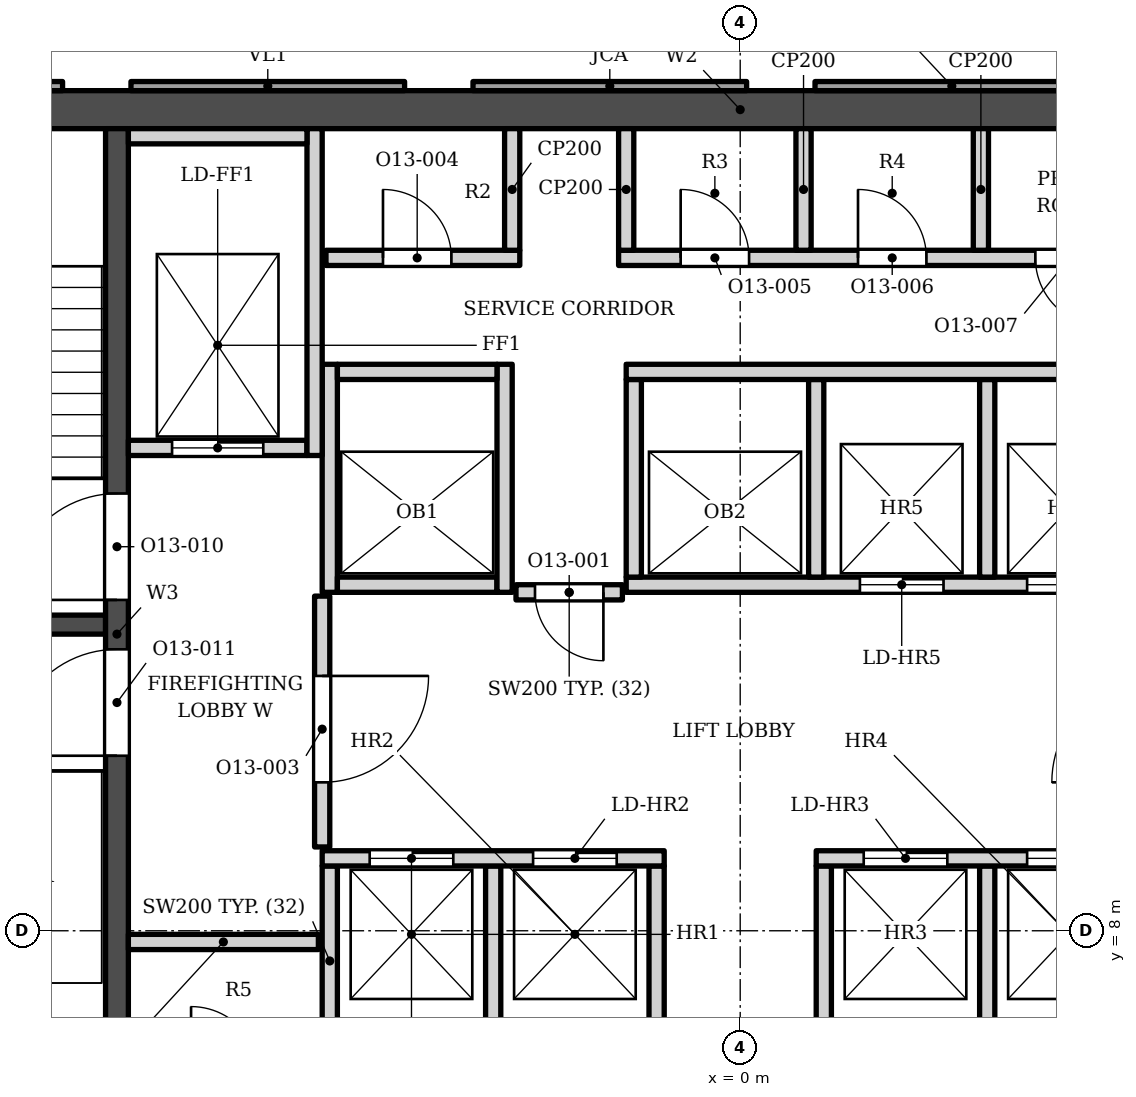
"""IFC4 building model, lengths in metres.
Left out: names, types, materials, properties, quantities, classifications, styles, units other than length and angle.
Written with IfcOpenShell. Run it as: python <this file> out.ifc"""

import sys

from ifc_helpers import new_model, si_unit, direction, frame, frame_2d, origin, place, context, subcontext, project, spatial, polyline, rectangle, outline, extrude, element, fill, save


model = new_model("IFC4")
c1 = context("Model", 3, precision=1e-05, world=origin(), true_north=direction((0.0, 1.0)))
c2 = subcontext(c1, "Body", "Model", "MODEL_VIEW")
j1 = project(units=[si_unit("LENGTHUNIT", "METRE"), si_unit("PLANEANGLEUNIT", "RADIAN")], contexts=[c1])
p1 = place(None, origin())
s1 = spatial("IfcSite", under=j1, at=p1, CompositionType="ELEMENT")
p2 = place(p1, origin())
s2 = spatial("IfcBuilding", under=s1, at=p2, CompositionType="ELEMENT")
p3 = place(p2, frame((0.0, 0.0, 287.2)))
s3 = spatial("IfcBuildingStorey", under=s2, at=p3, CompositionType="ELEMENT", Elevation=287.2)
p4 = place(p3, frame((-12.1, 18.802, 0.0), z_axis=(0.0, 0.0, 1.0), x_axis=(1.0, 0.0, 0.0)))
e1 = element("IfcWall", 1, at=p4, inside=s3, PredefinedType="SHEAR", context=c2, shape_type="SweptSolid", body=[
    extrude(rectangle(XDim=24.2, YDim=0.5, at=frame_2d((12.1, 0.0))), origin(), (0.0, 0.0, 1.0), 3.9),
])
p5 = place(p3, frame((-8.2, 5.253, 0.0), z_axis=(0.0, 0.0, 1.0), x_axis=(0.0, 1.0, 0.0)))
e2 = element("IfcWall", 2, at=p5, inside=s3, PredefinedType="SHEAR", context=c2, shape_type="SweptSolid", body=[
    extrude(rectangle(XDim=13.3, YDim=0.3, at=frame_2d((6.65, 0.0))), origin(), (0.0, 0.0, 1.0), 3.9),
])
p6 = place(p5, frame((7.1, 0.0, 0.0)))
e3 = element("IfcOpeningElement", 3, at=p6, cuts=e2, PredefinedType="OPENING", context=c2, shape_type="SweptSolid", body=[
    extrude(rectangle(XDim=1.4, YDim=2.1, at=frame_2d((0.7, 1.05))), frame((0.0, 0.16, 0.0), z_axis=(0.0, -1.0, 0.0), x_axis=(1.0, 0.0, 0.0)), (0.0, 0.0, 1.0), 0.32),
])
p7 = place(p5, frame((5.05, 0.0, 0.0)))
e4 = element("IfcOpeningElement", 4, at=p7, cuts=e2, PredefinedType="OPENING", context=c2, shape_type="SweptSolid", body=[
    extrude(rectangle(XDim=1.4, YDim=2.1, at=frame_2d((0.7, 1.05))), frame((0.0, 0.16, 0.0), z_axis=(0.0, -1.0, 0.0), x_axis=(1.0, 0.0, 0.0)), (0.0, 0.0, 1.0), 0.32),
])
p8 = place(p3, frame((-12.1, 12.028, 0.0), z_axis=(0.0, 0.0, 1.0), x_axis=(1.0, 0.0, 0.0)))
e5 = element("IfcWall", 5, at=p8, inside=s3, PredefinedType="SHEAR", context=c2, shape_type="SweptSolid", body=[
    extrude(rectangle(XDim=3.75, YDim=0.25, at=frame_2d((1.875, 0.0))), origin(), (0.0, 0.0, 1.0), 3.9),
])
p9 = place(p3, origin())
e6 = element("IfcWall", 6, at=p9, inside=s3, PredefinedType="ELEMENTEDWALL", context=c2, shape_type="SweptSolid", body=[
    extrude(outline(polyline([(0.984, 19.173), (0.984, 19.052), (4.584, 19.052), (4.584, 19.173), (0.984, 19.173)])), origin(), (0.0, 0.0, 1.0), 3.0),
])
p10 = place(p3, origin())
e7 = element("IfcWall", 7, at=p10, inside=s3, PredefinedType="SOLIDWALL", context=c2, shape_type="SweptSolid", body=[
    extrude(outline(polyline([(-3.516, 19.173), (-3.516, 19.052), (0.084, 19.052), (0.084, 19.173), (-3.516, 19.173)])), origin(), (0.0, 0.0, 1.0), 3.0),
])
p11 = place(p3, origin())
e8 = element("IfcWall", 8, at=p11, inside=s3, PredefinedType="ELEMENTEDWALL", context=c2, shape_type="SweptSolid", body=[
    extrude(outline(polyline([(-8.016, 19.173), (-8.016, 19.052), (-4.416, 19.052), (-4.416, 19.173), (-8.016, 19.173)])), origin(), (0.0, 0.0, 1.0), 3.0),
])
p12 = place(p3, origin())
e9 = element("IfcWall", 9, at=p12, inside=s3, PredefinedType="SOLIDWALL", context=c2, shape_type="SweptSolid", body=[
    extrude(outline(polyline([(-12.515, 19.173), (-12.515, 19.052), (-8.916, 19.052), (-8.916, 19.173), (-12.515, 19.173)])), origin(), (0.0, 0.0, 1.0), 3.0),
])
for number, where, z_axis, x_axis in (
    (10, (-5.4, 6.353, 0.0), (0.0, 0.0, 1.0), (0.0, 1.0, 0.0)),
    (11, (-3.25, 6.353, 0.0), (0.0, 0.0, 1.0), (0.0, 1.0, 0.0)),
    (12, (-1.1, 6.353, 0.0), (0.0, 0.0, 1.0), (0.0, 1.0, 0.0)),
    (13, (1.1, 6.353, 0.0), (0.0, 0.0, 1.0), (0.0, 1.0, 0.0)),
    (14, (3.25, 6.353, 0.0), (0.0, 0.0, 1.0), (0.0, 1.0, 0.0)),
    (15, (-8.05, 7.853, 0.0), (0.0, 0.0, 1.0), (1.0, 0.0, 0.0)),
):
    element("IfcWall", number, at=place(p3, frame(where, z_axis=z_axis, x_axis=x_axis)), inside=s3, PredefinedType="SOLIDWALL", context=c2, shape_type="SweptSolid", body=[
        extrude(rectangle(XDim=2.5, YDim=0.2, at=frame_2d((1.25, 0.0))), origin(), (0.0, 0.0, 1.0), 3.73),
    ])
p13 = place(p3, frame((-5.5, 8.953, 0.0), z_axis=(0.0, 0.0, 1.0), x_axis=(1.0, 0.0, 0.0)))
e16 = element("IfcWall", 16, at=p13, inside=s3, PredefinedType="SOLIDWALL", context=c2, shape_type="SweptSolid", body=[
    extrude(rectangle(XDim=4.5, YDim=0.2, at=frame_2d((2.25, 0.0))), origin(), (0.0, 0.0, 1.0), 3.73),
])
p14 = place(p13, frame((0.625, 0.0, 0.0)))
e17 = element("IfcOpeningElement", 17, at=p14, cuts=e16, PredefinedType="OPENING", context=c2, shape_type="SweptSolid", body=[
    extrude(rectangle(XDim=1.1, YDim=2.1, at=frame_2d((0.55, 1.05))), frame((0.0, 0.11, 0.0), z_axis=(0.0, -1.0, 0.0), x_axis=(1.0, 0.0, 0.0)), (0.0, 0.0, 1.0), 0.22),
])
p15 = place(p13, frame((2.775, 0.0, 0.0)))
e18 = element("IfcOpeningElement", 18, at=p15, cuts=e16, PredefinedType="OPENING", context=c2, shape_type="SweptSolid", body=[
    extrude(rectangle(XDim=1.1, YDim=2.1, at=frame_2d((0.55, 1.05))), frame((0.0, 0.11, 0.0), z_axis=(0.0, -1.0, 0.0), x_axis=(1.0, 0.0, 0.0)), (0.0, 0.0, 1.0), 0.22),
])
p16 = place(p3, frame((1.0, 8.953, 0.0), z_axis=(0.0, 0.0, 1.0), x_axis=(1.0, 0.0, 0.0)))
e19 = element("IfcWall", 19, at=p16, inside=s3, PredefinedType="SOLIDWALL", context=c2, shape_type="SweptSolid", body=[
    extrude(rectangle(XDim=4.5, YDim=0.2, at=frame_2d((2.25, 0.0))), origin(), (0.0, 0.0, 1.0), 3.73),
])
p17 = place(p16, frame((0.625, 0.0, 0.0)))
e20 = element("IfcOpeningElement", 20, at=p17, cuts=e19, PredefinedType="OPENING", context=c2, shape_type="SweptSolid", body=[
    extrude(rectangle(XDim=1.1, YDim=2.1, at=frame_2d((0.55, 1.05))), frame((0.0, 0.11, 0.0), z_axis=(0.0, -1.0, 0.0), x_axis=(1.0, 0.0, 0.0)), (0.0, 0.0, 1.0), 0.22),
])
p18 = place(p16, frame((2.775, 0.0, 0.0)))
e21 = element("IfcOpeningElement", 21, at=p18, cuts=e19, PredefinedType="OPENING", context=c2, shape_type="SweptSolid", body=[
    extrude(rectangle(XDim=1.1, YDim=2.1, at=frame_2d((0.55, 1.05))), frame((0.0, 0.11, 0.0), z_axis=(0.0, -1.0, 0.0), x_axis=(1.0, 0.0, 0.0)), (0.0, 0.0, 1.0), 0.22),
])
p19 = place(p3, frame((-5.5, 9.103, 0.0), z_axis=(0.0, 0.0, 1.0), x_axis=(0.0, 1.0, 0.0)))
e22 = element("IfcWall", 22, at=p19, inside=s3, PredefinedType="SOLIDWALL", context=c2, shape_type="SweptSolid", body=[
    extrude(rectangle(XDim=3.3, YDim=0.2, at=frame_2d((1.65, 0.0))), origin(), (0.0, 0.0, 1.0), 3.73),
])
p20 = place(p19, frame((0.85, 0.0, 0.0)))
e23 = element("IfcOpeningElement", 23, at=p20, cuts=e22, PredefinedType="OPENING", context=c2, shape_type="SweptSolid", body=[
    extrude(rectangle(XDim=1.4, YDim=2.1, at=frame_2d((0.7, 1.05))), frame((0.0, 0.11, 0.0), z_axis=(0.0, -1.0, 0.0), x_axis=(1.0, 0.0, 0.0)), (0.0, 0.0, 1.0), 0.22),
])
p21 = place(p3, frame((-2.95, 12.453, 0.0), z_axis=(0.0, 0.0, 1.0), x_axis=(1.0, 0.0, 0.0)))
e24 = element("IfcWall", 24, at=p21, inside=s3, PredefinedType="SOLIDWALL", context=c2, shape_type="SweptSolid", body=[
    extrude(rectangle(XDim=1.4, YDim=0.2, at=frame_2d((0.7, 0.0))), origin(), (0.0, 0.0, 1.0), 3.73),
])
p22 = place(p21, frame((0.25, 0.0, 0.0)))
e25 = element("IfcOpeningElement", 25, at=p22, cuts=e24, PredefinedType="OPENING", context=c2, shape_type="SweptSolid", body=[
    extrude(rectangle(XDim=0.9, YDim=2.1, at=frame_2d((0.45, 1.05))), frame((0.0, 0.11, 0.0), z_axis=(0.0, -1.0, 0.0), x_axis=(1.0, 0.0, 0.0)), (0.0, 0.0, 1.0), 0.22),
])
p23 = place(p3, frame((-5.4, 12.453, 0.0), z_axis=(0.0, 0.0, 1.0), x_axis=(0.0, 1.0, 0.0)))
e26 = element("IfcWall", 26, at=p23, inside=s3, PredefinedType="SOLIDWALL", context=c2, shape_type="SweptSolid", body=[
    extrude(rectangle(XDim=3.0, YDim=0.2, at=frame_2d((1.5, 0.0))), origin(), (0.0, 0.0, 1.0), 3.73),
])
p24 = place(p3, frame((-5.3, 12.552, 0.0), z_axis=(0.0, 0.0, 1.0), x_axis=(1.0, 0.0, 0.0)))
e27 = element("IfcWall", 27, at=p24, inside=s3, PredefinedType="SOLIDWALL", context=c2, shape_type="SweptSolid", body=[
    extrude(rectangle(XDim=2.1, YDim=0.2, at=frame_2d((1.05, 0.0))), origin(), (0.0, 0.0, 1.0), 3.73),
])
p25 = place(p3, frame((-3.1, 12.453, 0.0), z_axis=(0.0, 0.0, 1.0), x_axis=(0.0, 1.0, 0.0)))
e28 = element("IfcWall", 28, at=p25, inside=s3, PredefinedType="SOLIDWALL", context=c2, shape_type="SweptSolid", body=[
    extrude(rectangle(XDim=3.0, YDim=0.2, at=frame_2d((1.5, 0.0))), origin(), (0.0, 0.0, 1.0), 3.73),
])
p26 = place(p3, frame((-1.5, 12.552, 0.0), z_axis=(0.0, 0.0, 1.0), x_axis=(1.0, 0.0, 0.0)))
e29 = element("IfcWall", 29, at=p26, inside=s3, PredefinedType="SOLIDWALL", context=c2, shape_type="SweptSolid", body=[
    extrude(rectangle(XDim=7.0, YDim=0.2, at=frame_2d((3.5, 0.0))), origin(), (0.0, 0.0, 1.0), 3.73),
])
p27 = place(p26, frame((3.075, 0.0, 0.0)))
e30 = element("IfcOpeningElement", 30, at=p27, cuts=e29, PredefinedType="OPENING", context=c2, shape_type="SweptSolid", body=[
    extrude(rectangle(XDim=1.1, YDim=2.1, at=frame_2d((0.55, 1.05))), frame((0.0, 0.11, 0.0), z_axis=(0.0, -1.0, 0.0), x_axis=(1.0, 0.0, 0.0)), (0.0, 0.0, 1.0), 0.22),
])
p28 = place(p26, frame((5.275, 0.0, 0.0)))
e31 = element("IfcOpeningElement", 31, at=p28, cuts=e29, PredefinedType="OPENING", context=c2, shape_type="SweptSolid", body=[
    extrude(rectangle(XDim=1.1, YDim=2.1, at=frame_2d((0.55, 1.05))), frame((0.0, 0.11, 0.0), z_axis=(0.0, -1.0, 0.0), x_axis=(1.0, 0.0, 0.0)), (0.0, 0.0, 1.0), 0.22),
])
for number, where, z_axis, x_axis in (
    (32, (-1.4, 12.653, 0.0), (0.0, 0.0, 1.0), (0.0, 1.0, 0.0)),
    (33, (1.0, 12.653, 0.0), (0.0, 0.0, 1.0), (0.0, 1.0, 0.0)),
    (34, (3.25, 12.653, 0.0), (0.0, 0.0, 1.0), (0.0, 1.0, 0.0)),
):
    element("IfcWall", number, at=place(p3, frame(where, z_axis=z_axis, x_axis=x_axis)), inside=s3, PredefinedType="SOLIDWALL", context=c2, shape_type="SweptSolid", body=[
        extrude(rectangle(XDim=2.6, YDim=0.2, at=frame_2d((1.3, 0.0))), origin(), (0.0, 0.0, 1.0), 3.73),
    ])
p29 = place(p3, frame((-8.05, 14.353, 0.0), z_axis=(0.0, 0.0, 1.0), x_axis=(1.0, 0.0, 0.0)))
e35 = element("IfcWall", 35, at=p29, inside=s3, PredefinedType="SOLIDWALL", context=c2, shape_type="SweptSolid", body=[
    extrude(rectangle(XDim=2.35, YDim=0.2, at=frame_2d((1.175, 0.0))), origin(), (0.0, 0.0, 1.0), 3.73),
])
p30 = place(p29, frame((0.575, 0.0, 0.0)))
e36 = element("IfcOpeningElement", 36, at=p30, cuts=e35, PredefinedType="OPENING", context=c2, shape_type="SweptSolid", body=[
    extrude(rectangle(XDim=1.2, YDim=2.1, at=frame_2d((0.6, 1.05))), frame((0.0, 0.11, 0.0), z_axis=(0.0, -1.0, 0.0), x_axis=(1.0, 0.0, 0.0)), (0.0, 0.0, 1.0), 0.22),
])
p31 = place(p3, frame((-5.6, 14.253, 0.0), z_axis=(0.0, 0.0, 1.0), x_axis=(0.0, 1.0, 0.0)))
e37 = element("IfcWall", 37, at=p31, inside=s3, PredefinedType="SOLIDWALL", context=c2, shape_type="SweptSolid", body=[
    extrude(rectangle(XDim=4.3, YDim=0.2, at=frame_2d((2.15, 0.0))), origin(), (0.0, 0.0, 1.0), 3.73),
])
p32 = place(p3, frame((-5.3, 15.353, 0.0), z_axis=(0.0, 0.0, 1.0), x_axis=(1.0, 0.0, 0.0)))
e38 = element("IfcWall", 38, at=p32, inside=s3, PredefinedType="SOLIDWALL", context=c2, shape_type="SweptSolid", body=[
    extrude(rectangle(XDim=2.1, YDim=0.2, at=frame_2d((1.05, 0.0))), origin(), (0.0, 0.0, 1.0), 3.73),
])
p33 = place(p3, frame((-1.5, 15.353, 0.0), z_axis=(0.0, 0.0, 1.0), x_axis=(1.0, 0.0, 0.0)))
e39 = element("IfcWall", 39, at=p33, inside=s3, PredefinedType="SOLIDWALL", context=c2, shape_type="SweptSolid", body=[
    extrude(rectangle(XDim=7.2, YDim=0.2, at=frame_2d((3.6, 0.0))), origin(), (0.0, 0.0, 1.0), 3.73),
])
p34 = place(p3, frame((-5.45, 16.853, 0.0), z_axis=(0.0, 0.0, 1.0), x_axis=(1.0, 0.0, 0.0)))
e40 = element("IfcWall", 40, at=p34, inside=s3, PredefinedType="SOLIDWALL", context=c2, shape_type="SweptSolid", body=[
    extrude(rectangle(XDim=2.55, YDim=0.2, at=frame_2d((1.275, 0.0))), origin(), (0.0, 0.0, 1.0), 3.73),
])
p35 = place(p34, frame((0.75, 0.0, 0.0)))
e41 = element("IfcOpeningElement", 41, at=p35, cuts=e40, PredefinedType="OPENING", context=c2, shape_type="SweptSolid", body=[
    extrude(rectangle(XDim=0.9, YDim=2.1, at=frame_2d((0.45, 1.05))), frame((0.0, 0.11, 0.0), z_axis=(0.0, -1.0, 0.0), x_axis=(1.0, 0.0, 0.0)), (0.0, 0.0, 1.0), 0.22),
])
p36 = place(p3, frame((-1.6, 16.853, 0.0), z_axis=(0.0, 0.0, 1.0), x_axis=(1.0, 0.0, 0.0)))
e42 = element("IfcWall", 42, at=p36, inside=s3, PredefinedType="SOLIDWALL", context=c2, shape_type="SweptSolid", body=[
    extrude(rectangle(XDim=7.05, YDim=0.2, at=frame_2d((3.525, 0.0))), origin(), (0.0, 0.0, 1.0), 3.73),
])
p37 = place(p36, frame((0.817, 0.0, 0.0)))
e43 = element("IfcOpeningElement", 43, at=p37, cuts=e42, PredefinedType="OPENING", context=c2, shape_type="SweptSolid", body=[
    extrude(rectangle(XDim=0.9, YDim=2.1, at=frame_2d((0.45, 1.05))), frame((0.0, 0.11, 0.0), z_axis=(0.0, -1.0, 0.0), x_axis=(1.0, 0.0, 0.0)), (0.0, 0.0, 1.0), 0.22),
])
p38 = place(p36, frame((3.15, 0.0, 0.0)))
e44 = element("IfcOpeningElement", 44, at=p38, cuts=e42, PredefinedType="OPENING", context=c2, shape_type="SweptSolid", body=[
    extrude(rectangle(XDim=0.9, YDim=2.1, at=frame_2d((0.45, 1.05))), frame((0.0, 0.11, 0.0), z_axis=(0.0, -1.0, 0.0), x_axis=(1.0, 0.0, 0.0)), (0.0, 0.0, 1.0), 0.22),
])
p39 = place(p36, frame((5.483, 0.0, 0.0)))
e45 = element("IfcOpeningElement", 45, at=p39, cuts=e42, PredefinedType="OPENING", context=c2, shape_type="SweptSolid", body=[
    extrude(rectangle(XDim=0.9, YDim=2.1, at=frame_2d((0.45, 1.05))), frame((0.0, 0.11, 0.0), z_axis=(0.0, -1.0, 0.0), x_axis=(1.0, 0.0, 0.0)), (0.0, 0.0, 1.0), 0.22),
])
for number, where, z_axis, x_axis in (
    (46, (-3.0, 16.953, 0.0), (0.0, 0.0, 1.0), (0.0, 1.0, 0.0)),
    (47, (-1.5, 16.953, 0.0), (0.0, 0.0, 1.0), (0.0, 1.0, 0.0)),
    (48, (0.833, 16.953, 0.0), (0.0, 0.0, 1.0), (0.0, 1.0, 0.0)),
    (49, (3.167, 16.953, 0.0), (0.0, 0.0, 1.0), (0.0, 1.0, 0.0)),
):
    element("IfcWall", number, at=place(p3, frame(where, z_axis=z_axis, x_axis=x_axis)), inside=s3, PredefinedType="PARTITIONING", context=c2, shape_type="SweptSolid", body=[
        extrude(rectangle(XDim=1.6, YDim=0.2, at=frame_2d((0.8, 0.0))), origin(), (0.0, 0.0, 1.0), 3.73),
    ])
p40 = place(p3, frame((-8.05, 18.453, 0.0), z_axis=(0.0, 0.0, 1.0), x_axis=(1.0, 0.0, 0.0)))
e50 = element("IfcWall", 50, at=p40, inside=s3, PredefinedType="SOLIDWALL", context=c2, shape_type="SweptSolid", body=[
    extrude(rectangle(XDim=2.35, YDim=0.2, at=frame_2d((1.175, 0.0))), origin(), (0.0, 0.0, 1.0), 3.73),
])
p41 = place(p14, origin())
e51 = element("IfcDoor", 51, at=p41, inside=s3, OperationType="DOUBLE_DOOR_SLIDING", PredefinedType="DOOR", context=c2, shape_type="SweptSolid", body=[
    extrude(rectangle(XDim=1.1, YDim=2.1, at=frame_2d((0.55, 1.05))), frame((0.0, 0.025, 0.0), z_axis=(0.0, -1.0, 0.0), x_axis=(1.0, 0.0, 0.0)), (0.0, 0.0, 1.0), 0.05),
])
fill(e17, e51)
p42 = place(p15, origin())
e52 = element("IfcDoor", 52, at=p42, inside=s3, OperationType="DOUBLE_DOOR_SLIDING", PredefinedType="DOOR", context=c2, shape_type="SweptSolid", body=[
    extrude(rectangle(XDim=1.1, YDim=2.1, at=frame_2d((0.55, 1.05))), frame((0.0, 0.025, 0.0), z_axis=(0.0, -1.0, 0.0), x_axis=(1.0, 0.0, 0.0)), (0.0, 0.0, 1.0), 0.05),
])
fill(e18, e52)
p43 = place(p17, origin())
e53 = element("IfcDoor", 53, at=p43, inside=s3, OperationType="DOUBLE_DOOR_SLIDING", PredefinedType="DOOR", context=c2, shape_type="SweptSolid", body=[
    extrude(rectangle(XDim=1.1, YDim=2.1, at=frame_2d((0.55, 1.05))), frame((0.0, 0.025, 0.0), z_axis=(0.0, -1.0, 0.0), x_axis=(1.0, 0.0, 0.0)), (0.0, 0.0, 1.0), 0.05),
])
fill(e20, e53)
p44 = place(p18, origin())
e54 = element("IfcDoor", 54, at=p44, inside=s3, OperationType="DOUBLE_DOOR_SLIDING", PredefinedType="DOOR", context=c2, shape_type="SweptSolid", body=[
    extrude(rectangle(XDim=1.1, YDim=2.1, at=frame_2d((0.55, 1.05))), frame((0.0, 0.025, 0.0), z_axis=(0.0, -1.0, 0.0), x_axis=(1.0, 0.0, 0.0)), (0.0, 0.0, 1.0), 0.05),
])
fill(e21, e54)
p45 = place(p27, origin())
e55 = element("IfcDoor", 55, at=p45, inside=s3, OperationType="DOUBLE_DOOR_SLIDING", PredefinedType="DOOR", context=c2, shape_type="SweptSolid", body=[
    extrude(rectangle(XDim=1.1, YDim=2.1, at=frame_2d((0.55, 1.05))), frame((0.0, 0.025, 0.0), z_axis=(0.0, -1.0, 0.0), x_axis=(1.0, 0.0, 0.0)), (0.0, 0.0, 1.0), 0.05),
])
fill(e30, e55)
p46 = place(p28, origin())
e56 = element("IfcDoor", 56, at=p46, inside=s3, OperationType="DOUBLE_DOOR_SLIDING", PredefinedType="DOOR", context=c2, shape_type="SweptSolid", body=[
    extrude(rectangle(XDim=1.1, YDim=2.1, at=frame_2d((0.55, 1.05))), frame((0.0, 0.025, 0.0), z_axis=(0.0, -1.0, 0.0), x_axis=(1.0, 0.0, 0.0)), (0.0, 0.0, 1.0), 0.05),
])
fill(e31, e56)
p47 = place(p30, origin())
e57 = element("IfcDoor", 57, at=p47, inside=s3, OperationType="DOUBLE_DOOR_SLIDING", PredefinedType="DOOR", context=c2, shape_type="SweptSolid", body=[
    extrude(rectangle(XDim=1.2, YDim=2.1, at=frame_2d((0.6, 1.05))), frame((0.0, 0.025, 0.0), z_axis=(0.0, -1.0, 0.0), x_axis=(1.0, 0.0, 0.0)), (0.0, 0.0, 1.0), 0.05),
])
fill(e36, e57)
p48 = place(p6, origin())
e58 = element("IfcDoor", 58, at=p48, inside=s3, OperationType="SINGLE_SWING_LEFT", PredefinedType="DOOR", context=c2, shape_type="SweptSolid", body=[
    extrude(rectangle(XDim=1.4, YDim=2.1, at=frame_2d((0.7, 1.05))), frame((0.0, 0.025, 0.0), z_axis=(0.0, -1.0, 0.0), x_axis=(1.0, 0.0, 0.0)), (0.0, 0.0, 1.0), 0.05),
])
fill(e3, e58)
p49 = place(p7, origin())
e59 = element("IfcDoor", 59, at=p49, inside=s3, OperationType="SINGLE_SWING_LEFT", PredefinedType="DOOR", context=c2, shape_type="SweptSolid", body=[
    extrude(rectangle(XDim=1.4, YDim=2.1, at=frame_2d((0.7, 1.05))), frame((0.0, 0.025, 0.0), z_axis=(0.0, -1.0, 0.0), x_axis=(1.0, 0.0, 0.0)), (0.0, 0.0, 1.0), 0.05),
])
fill(e4, e59)
p50 = place(p22, origin())
e60 = element("IfcDoor", 60, at=p50, inside=s3, OperationType="SINGLE_SWING_RIGHT", PredefinedType="DOOR", context=c2, shape_type="SweptSolid", body=[
    extrude(rectangle(XDim=0.9, YDim=2.1, at=frame_2d((0.45, 1.05))), frame((0.0, 0.025, 0.0), z_axis=(0.0, -1.0, 0.0), x_axis=(1.0, 0.0, 0.0)), (0.0, 0.0, 1.0), 0.05),
])
fill(e25, e60)
p51 = place(p20, origin())
e61 = element("IfcDoor", 61, at=p51, inside=s3, OperationType="SINGLE_SWING_RIGHT", PredefinedType="DOOR", context=c2, shape_type="SweptSolid", body=[
    extrude(rectangle(XDim=1.4, YDim=2.1, at=frame_2d((0.7, 1.05))), frame((0.0, 0.025, 0.0), z_axis=(0.0, -1.0, 0.0), x_axis=(1.0, 0.0, 0.0)), (0.0, 0.0, 1.0), 0.05),
])
fill(e23, e61)
p52 = place(p35, origin())
e62 = element("IfcDoor", 62, at=p52, inside=s3, OperationType="SINGLE_SWING_LEFT", PredefinedType="DOOR", context=c2, shape_type="SweptSolid", body=[
    extrude(rectangle(XDim=0.9, YDim=2.1, at=frame_2d((0.45, 1.05))), frame((0.0, 0.025, 0.0), z_axis=(0.0, -1.0, 0.0), x_axis=(1.0, 0.0, 0.0)), (0.0, 0.0, 1.0), 0.05),
])
fill(e41, e62)
p53 = place(p37, origin())
e63 = element("IfcDoor", 63, at=p53, inside=s3, OperationType="SINGLE_SWING_LEFT", PredefinedType="DOOR", context=c2, shape_type="SweptSolid", body=[
    extrude(rectangle(XDim=0.9, YDim=2.1, at=frame_2d((0.45, 1.05))), frame((0.0, 0.025, 0.0), z_axis=(0.0, -1.0, 0.0), x_axis=(1.0, 0.0, 0.0)), (0.0, 0.0, 1.0), 0.05),
])
fill(e43, e63)
p54 = place(p38, origin())
e64 = element("IfcDoor", 64, at=p54, inside=s3, OperationType="SINGLE_SWING_LEFT", PredefinedType="DOOR", context=c2, shape_type="SweptSolid", body=[
    extrude(rectangle(XDim=0.9, YDim=2.1, at=frame_2d((0.45, 1.05))), frame((0.0, 0.025, 0.0), z_axis=(0.0, -1.0, 0.0), x_axis=(1.0, 0.0, 0.0)), (0.0, 0.0, 1.0), 0.05),
])
fill(e44, e64)
p55 = place(p39, origin())
e65 = element("IfcDoor", 65, at=p55, inside=s3, OperationType="SINGLE_SWING_RIGHT", PredefinedType="DOOR", context=c2, shape_type="SweptSolid", body=[
    extrude(rectangle(XDim=0.9, YDim=2.1, at=frame_2d((0.45, 1.05))), frame((0.0, 0.025, 0.0), z_axis=(0.0, -1.0, 0.0), x_axis=(1.0, 0.0, 0.0)), (0.0, 0.0, 1.0), 0.05),
])
fill(e45, e65)
save(model, sys.argv[1])
